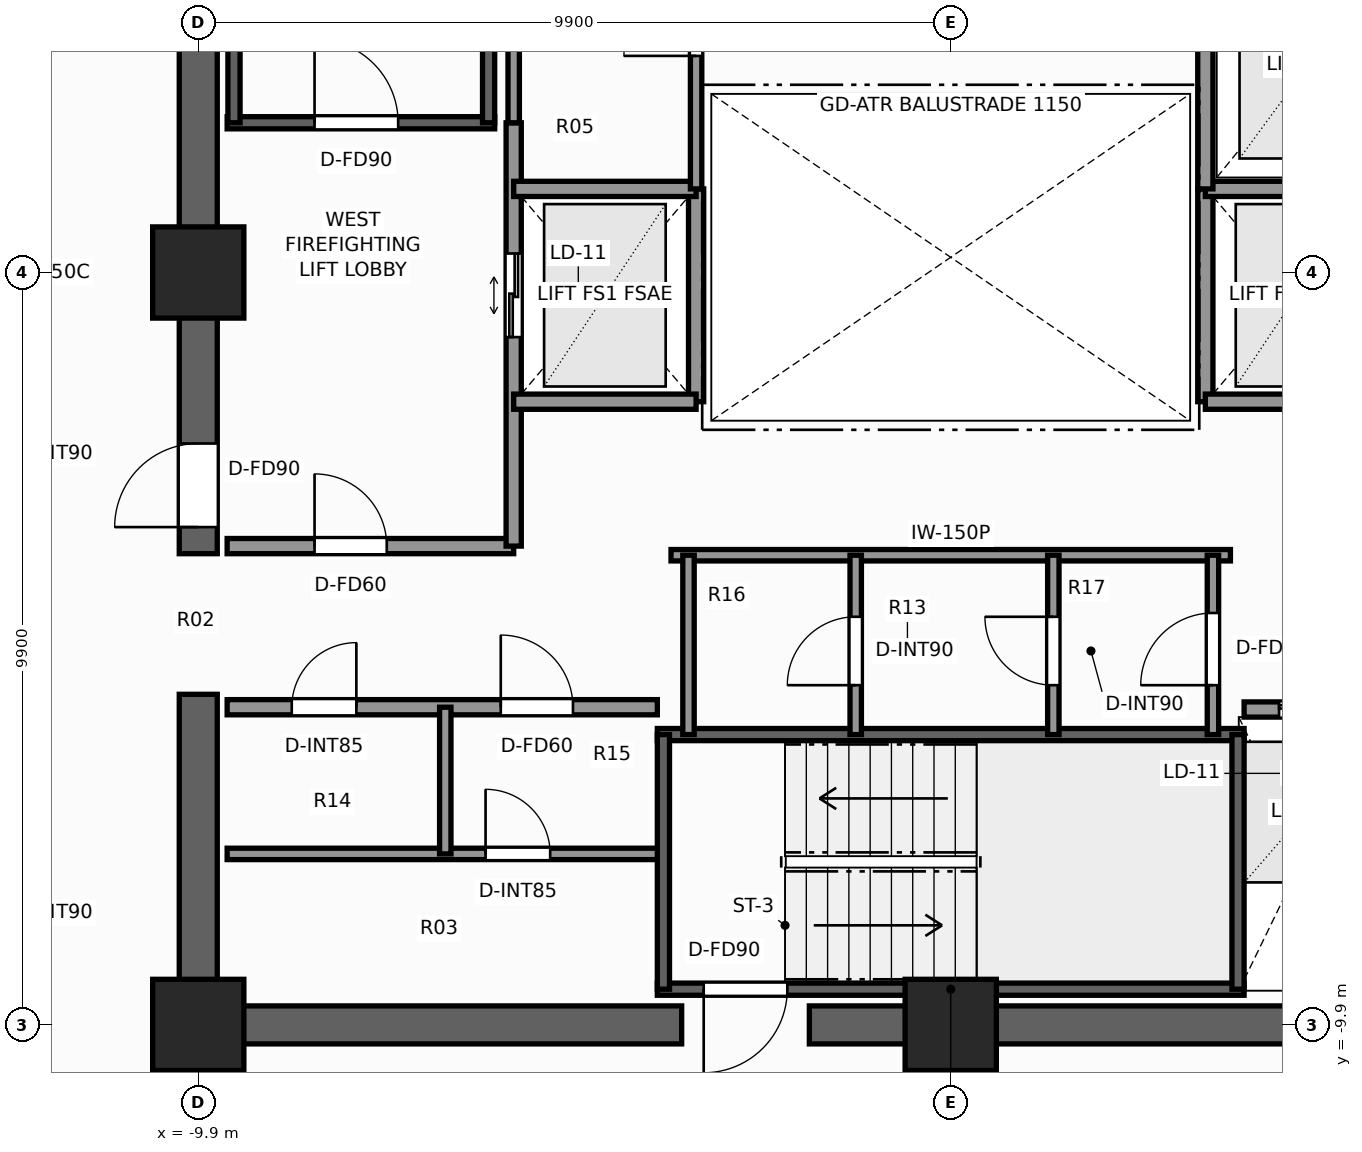
"""IFC4 building model, lengths in metres.
Left out: names, types, materials, properties, quantities, classifications, styles, units other than length and angle.
Written with IfcOpenShell. Run it as: python <this file> out.ifc"""

import sys

from ifc_helpers import new_model, si_unit, direction, frame, frame_2d, origin, origin_2d, place, context, subcontext, project, spatial, rectangle, extrude, element, fill, save


model = new_model("IFC4")
c1 = context("Model", 3, precision=1e-05, world=origin(), true_north=direction((0.0, 1.0)))
c2 = subcontext(c1, "Body", "Model", "MODEL_VIEW")
j1 = project(units=[si_unit("LENGTHUNIT", "METRE"), si_unit("PLANEANGLEUNIT", "RADIAN")], contexts=[c1])
p1 = place(None, origin())
s1 = spatial("IfcSite", under=j1, at=p1, CompositionType="ELEMENT")
p2 = place(p1, origin())
s2 = spatial("IfcBuilding", under=s1, at=p2, CompositionType="ELEMENT")
p3 = place(p2, frame((0.0, 0.0, 170.1)))
s3 = spatial("IfcBuildingStorey", under=s2, at=p3, CompositionType="ELEMENT", Elevation=170.1)
p4 = place(p3, frame((10.15, -9.9, 0.0), z_axis=(0.0, 0.0, 1.0), x_axis=(-1.0, 0.0, 0.0)))
e1 = element("IfcWall", 1, at=p4, inside=s3, PredefinedType="SHEAR", context=c2, shape_type="SweptSolid", body=[
    extrude(rectangle(XDim=12.01, YDim=0.5, at=frame_2d((6.005, 0.0))), origin(), (0.0, 0.0, 1.0), 3.3),
])
p5 = place(p3, frame((-3.54, -9.9, 0.0), z_axis=(0.0, 0.0, 1.0), x_axis=(-1.0, 0.0, 0.0)))
e2 = element("IfcWall", 2, at=p5, inside=s3, PredefinedType="SHEAR", context=c2, shape_type="SweptSolid", body=[
    extrude(rectangle(XDim=6.61, YDim=0.5, at=frame_2d((3.305, 0.0))), origin(), (0.0, 0.0, 1.0), 3.3),
])
p6 = place(p3, frame((-9.9, -9.65, 0.0), z_axis=(0.0, 0.0, 1.0), x_axis=(0.0, 1.0, 0.0)))
e3 = element("IfcWall", 3, at=p6, inside=s3, PredefinedType="SHEAR", context=c2, shape_type="SweptSolid", body=[
    extrude(rectangle(XDim=4.1, YDim=0.5, at=frame_2d((2.05, 0.0))), origin(), (0.0, 0.0, 1.0), 3.3),
])
p7 = place(p3, frame((-9.9, -3.7, 0.0), z_axis=(0.0, 0.0, 1.0), x_axis=(0.0, 1.0, 0.0)))
e4 = element("IfcWall", 4, at=p7, inside=s3, PredefinedType="SHEAR", context=c2, shape_type="SweptSolid", body=[
    extrude(rectangle(XDim=13.35, YDim=0.5, at=frame_2d((6.675, 0.0))), origin(), (0.0, 0.0, 1.0), 3.3),
])
p8 = place(p7, frame((0.35, 0.0, 0.0)))
e5 = element("IfcOpeningElement", 5, at=p8, cuts=e4, PredefinedType="OPENING", context=c2, shape_type="SweptSolid", body=[
    extrude(rectangle(XDim=1.1, YDim=2.2, at=frame_2d((0.55, 1.1))), frame((0.0, 0.26, 0.0), z_axis=(0.0, -1.0, 0.0), x_axis=(1.0, 0.0, 0.0)), (0.0, 0.0, 1.0), 0.52),
])
for number, where, z_axis, x_axis in (
    (6, (-9.9, -9.9, 0.0), (0.0, 0.0, 1.0), (1.0, 0.0, 0.0)),
    (7, (0.0, -9.9, 0.0), (0.0, 0.0, 1.0), (1.0, 0.0, 0.0)),
    (8, (-9.9, 0.0, 0.0), (0.0, 0.0, 1.0), (1.0, 0.0, 0.0)),
):
    element("IfcColumn", number, at=place(p3, frame(where, z_axis=z_axis, x_axis=x_axis)), inside=s3, PredefinedType="COLUMN", context=c2, shape_type="SweptSolid", body=[
        extrude(rectangle(XDim=1.2, YDim=1.2, at=origin_2d()), origin(), (0.0, 0.0, 1.0), 3.3),
    ])
p9 = place(p3, frame((-9.52, 1.97, 0.0), z_axis=(0.0, 0.0, 1.0), x_axis=(1.0, 0.0, 0.0)))
e9 = element("IfcWall", 9, at=p9, inside=s3, PredefinedType="SHEAR", context=c2, shape_type="SweptSolid", body=[
    extrude(rectangle(XDim=3.52, YDim=0.16, at=frame_2d((1.76, 0.0))), origin(), (0.0, 0.0, 1.0), 3.3),
])
p10 = place(p9, frame((1.15, 0.0, 0.0)))
e10 = element("IfcOpeningElement", 10, at=p10, cuts=e9, PredefinedType="OPENING", context=c2, shape_type="SweptSolid", body=[
    extrude(rectangle(XDim=1.1, YDim=2.2, at=frame_2d((0.55, 1.1))), frame((0.0, 0.09, 0.0), z_axis=(0.0, -1.0, 0.0), x_axis=(1.0, 0.0, 0.0)), (0.0, 0.0, 1.0), 0.18),
])
for number, where, z_axis, x_axis in (
    (11, (-9.43, 1.97, 0.0), (0.0, 0.0, 1.0), (0.0, 1.0, 0.0)),
    (12, (-6.08, 1.97, 0.0), (0.0, 0.0, 1.0), (0.0, 1.0, 0.0)),
):
    element("IfcWall", number, at=place(p3, frame(where, z_axis=z_axis, x_axis=x_axis)), inside=s3, PredefinedType="SHEAR", context=c2, shape_type="SweptSolid", body=[
        extrude(rectangle(XDim=7.56, YDim=0.16, at=frame_2d((3.78, 0.0))), origin(), (0.0, 0.0, 1.0), 3.3),
    ])
p11 = place(p3, frame((3.86, -9.43, 0.0), z_axis=(0.0, 0.0, 1.0), x_axis=(-1.0, 0.0, 0.0)))
e13 = element("IfcWall", 13, at=p11, inside=s3, PredefinedType="SHEAR", context=c2, shape_type="SweptSolid", body=[
    extrude(rectangle(XDim=7.72, YDim=0.16, at=frame_2d((3.86, 0.0))), origin(), (0.0, 0.0, 1.0), 3.3),
])
p12 = place(p11, frame((6.01, 0.0, 0.0)))
e14 = element("IfcOpeningElement", 14, at=p12, cuts=e13, PredefinedType="OPENING", context=c2, shape_type="SweptSolid", body=[
    extrude(rectangle(XDim=1.1, YDim=2.2, at=frame_2d((0.55, 1.1))), frame((0.0, 0.09, 0.0), z_axis=(0.0, -1.0, 0.0), x_axis=(1.0, 0.0, 0.0)), (0.0, 0.0, 1.0), 0.18),
])
p13 = place(p3, frame((-3.86, -6.08, 0.0), z_axis=(0.0, 0.0, 1.0), x_axis=(1.0, 0.0, 0.0)))
e15 = element("IfcWall", 15, at=p13, inside=s3, PredefinedType="SHEAR", context=c2, shape_type="SweptSolid", body=[
    extrude(rectangle(XDim=7.72, YDim=0.16, at=frame_2d((3.86, 0.0))), origin(), (0.0, 0.0, 1.0), 3.3),
])
for number, where, z_axis, x_axis in (
    (16, (-3.78, -9.43, 0.0), (0.0, 0.0, 1.0), (0.0, 1.0, 0.0)),
    (17, (3.78, -9.43, 0.0), (0.0, 0.0, 1.0), (0.0, 1.0, 0.0)),
):
    element("IfcWall", number, at=place(p3, frame(where, z_axis=z_axis, x_axis=x_axis)), inside=s3, PredefinedType="SHEAR", context=c2, shape_type="SweptSolid", body=[
        extrude(rectangle(XDim=3.35, YDim=0.16, at=frame_2d((1.675, 0.0))), origin(), (0.0, 0.0, 1.0), 3.3),
    ])
p14 = place(p3, frame((-9.52, -3.6, 0.0), z_axis=(0.0, 0.0, 1.0), x_axis=(1.0, 0.0, 0.0)))
e18 = element("IfcWall", 18, at=p14, inside=s3, PredefinedType="SOLIDWALL", context=c2, shape_type="SweptSolid", body=[
    extrude(rectangle(XDim=3.77, YDim=0.2, at=frame_2d((1.885, 0.0))), origin(), (0.0, 0.0, 1.0), 3.08),
])
p15 = place(p14, frame((1.15, 0.0, 0.0)))
e19 = element("IfcOpeningElement", 19, at=p15, cuts=e18, PredefinedType="OPENING", context=c2, shape_type="SweptSolid", body=[
    extrude(rectangle(XDim=0.95, YDim=2.06, at=frame_2d((0.475, 1.03))), frame((0.0, 0.11, 0.0), z_axis=(0.0, -1.0, 0.0), x_axis=(1.0, 0.0, 0.0)), (0.0, 0.0, 1.0), 0.22),
])
p16 = place(p3, frame((-5.75, -3.6, 0.0), z_axis=(0.0, 0.0, 1.0), x_axis=(0.0, 1.0, 0.0)))
e20 = element("IfcWall", 20, at=p16, inside=s3, PredefinedType="SOLIDWALL", context=c2, shape_type="SweptSolid", body=[
    extrude(rectangle(XDim=5.57, YDim=0.2, at=frame_2d((2.785, 0.0))), origin(), (0.0, 0.0, 1.0), 2.715),
])
p17 = place(p16, frame((2.75, 0.0, 0.0)))
e21 = element("IfcOpeningElement", 21, at=p17, cuts=e20, PredefinedType="OPENING", context=c2, shape_type="SweptSolid", body=[
    extrude(rectangle(XDim=1.1, YDim=2.2, at=frame_2d((0.55, 1.1))), frame((0.0, 0.11, 0.0), z_axis=(0.0, -1.0, 0.0), x_axis=(1.0, 0.0, 0.0)), (0.0, 0.0, 1.0), 0.22),
])
p18 = place(p3, frame((-3.35, -1.7, 0.0), z_axis=(0.0, 0.0, 1.0), x_axis=(0.0, 1.0, 0.0)))
e22 = element("IfcWall", 22, at=p18, inside=s3, PredefinedType="SOLIDWALL", context=c2, shape_type="SweptSolid", body=[
    extrude(rectangle(XDim=2.8, YDim=0.2, at=frame_2d((1.4, 0.0))), origin(), (0.0, 0.0, 1.0), 2.715),
])
for number, where, z_axis, x_axis in (
    (23, (-5.75, -1.7, 0.0), (0.0, 0.0, 1.0), (1.0, 0.0, 0.0)),
    (24, (-5.75, 1.1, 0.0), (0.0, 0.0, 1.0), (1.0, 0.0, 0.0)),
):
    element("IfcWall", number, at=place(p3, frame(where, z_axis=z_axis, x_axis=x_axis)), inside=s3, PredefinedType="SOLIDWALL", context=c2, shape_type="SweptSolid", body=[
        extrude(rectangle(XDim=2.4, YDim=0.2, at=frame_2d((1.2, 0.0))), origin(), (0.0, 0.0, 1.0), 3.08),
    ])
p19 = place(p3, frame((3.35, -1.7, 0.0), z_axis=(0.0, 0.0, 1.0), x_axis=(0.0, 1.0, 0.0)))
e25 = element("IfcWall", 25, at=p19, inside=s3, PredefinedType="SOLIDWALL", context=c2, shape_type="SweptSolid", body=[
    extrude(rectangle(XDim=2.8, YDim=0.2, at=frame_2d((1.4, 0.0))), origin(), (0.0, 0.0, 1.0), 2.715),
])
for number, where, z_axis, x_axis in (
    (26, (3.35, -1.7, 0.0), (0.0, 0.0, 1.0), (1.0, 0.0, 0.0)),
    (27, (3.35, 1.1, 0.0), (0.0, 0.0, 1.0), (1.0, 0.0, 0.0)),
):
    element("IfcWall", number, at=place(p3, frame(where, z_axis=z_axis, x_axis=x_axis)), inside=s3, PredefinedType="SOLIDWALL", context=c2, shape_type="SweptSolid", body=[
        extrude(rectangle(XDim=2.4, YDim=0.2, at=frame_2d((1.2, 0.0))), origin(), (0.0, 0.0, 1.0), 3.08),
    ])
p20 = place(p3, frame((3.35, 1.1, 0.0), z_axis=(0.0, 0.0, 1.0), x_axis=(0.0, 1.0, 0.0)))
e28 = element("IfcWall", 28, at=p20, inside=s3, PredefinedType="SOLIDWALL", context=c2, shape_type="SweptSolid", body=[
    extrude(rectangle(XDim=3.2, YDim=0.2, at=frame_2d((1.6, 0.0))), origin(), (0.0, 0.0, 1.0), 2.715),
])
p21 = place(p3, frame((-9.52, -5.72, 0.0), z_axis=(0.0, 0.0, 1.0), x_axis=(1.0, 0.0, 0.0)))
e29 = element("IfcWall", 29, at=p21, inside=s3, PredefinedType="SOLIDWALL", context=c2, shape_type="SweptSolid", body=[
    extrude(rectangle(XDim=5.66, YDim=0.2, at=frame_2d((2.83, 0.0))), origin(), (0.0, 0.0, 1.0), 3.08),
])
p22 = place(p21, frame((3.6, 0.0, 0.0)))
e30 = element("IfcOpeningElement", 30, at=p22, cuts=e29, PredefinedType="OPENING", context=c2, shape_type="SweptSolid", body=[
    extrude(rectangle(XDim=0.95, YDim=2.06, at=frame_2d((0.475, 1.03))), frame((0.0, 0.11, 0.0), z_axis=(0.0, -1.0, 0.0), x_axis=(1.0, 0.0, 0.0)), (0.0, 0.0, 1.0), 0.22),
])
p23 = place(p21, frame((0.85, 0.0, 0.0)))
e31 = element("IfcOpeningElement", 31, at=p23, cuts=e29, PredefinedType="OPENING", context=c2, shape_type="SweptSolid", body=[
    extrude(rectangle(XDim=0.85, YDim=2.03, at=frame_2d((0.425, 1.015))), frame((0.0, 0.11, 0.0), z_axis=(0.0, -1.0, 0.0), x_axis=(1.0, 0.0, 0.0)), (0.0, 0.0, 1.0), 0.22),
])
p24 = place(p3, frame((-9.52, -7.65, 0.0), z_axis=(0.0, 0.0, 1.0), x_axis=(1.0, 0.0, 0.0)))
e32 = element("IfcWall", 32, at=p24, inside=s3, PredefinedType="PARTITIONING", context=c2, shape_type="SweptSolid", body=[
    extrude(rectangle(XDim=5.66, YDim=0.15, at=frame_2d((2.83, 0.0))), origin(), (0.0, 0.0, 1.0), 3.08),
])
p25 = place(p24, frame((3.4, 0.0, 0.0)))
e33 = element("IfcOpeningElement", 33, at=p25, cuts=e32, PredefinedType="OPENING", context=c2, shape_type="SweptSolid", body=[
    extrude(rectangle(XDim=0.85, YDim=2.03, at=frame_2d((0.425, 1.015))), frame((0.0, 0.085, 0.0), z_axis=(0.0, -1.0, 0.0), x_axis=(1.0, 0.0, 0.0)), (0.0, 0.0, 1.0), 0.17),
])
p26 = place(p3, frame((-6.65, -7.65, 0.0), z_axis=(0.0, 0.0, 1.0), x_axis=(0.0, 1.0, 0.0)))
e34 = element("IfcWall", 34, at=p26, inside=s3, PredefinedType="PARTITIONING", context=c2, shape_type="SweptSolid", body=[
    extrude(rectangle(XDim=1.93, YDim=0.15, at=frame_2d((0.965, 0.0))), origin(), (0.0, 0.0, 1.0), 3.08),
])
p27 = place(p3, frame((3.86, -5.75, 0.0), z_axis=(0.0, 0.0, 1.0), x_axis=(1.0, 0.0, 0.0)))
e35 = element("IfcWall", 35, at=p27, inside=s3, PredefinedType="SOLIDWALL", context=c2, shape_type="SweptSolid", body=[
    extrude(rectangle(XDim=5.66, YDim=0.2, at=frame_2d((2.83, 0.0))), origin(), (0.0, 0.0, 1.0), 3.08),
])
p28 = place(p27, frame((0.46, 0.0, 0.0)))
e36 = element("IfcOpeningElement", 36, at=p28, cuts=e35, PredefinedType="OPENING", context=c2, shape_type="SweptSolid", body=[
    extrude(rectangle(XDim=1.1, YDim=2.2, at=frame_2d((0.55, 1.1))), frame((0.0, 0.11, 0.0), z_axis=(0.0, -1.0, 0.0), x_axis=(1.0, 0.0, 0.0)), (0.0, 0.0, 1.0), 0.22),
])
p29 = place(p27, frame((2.39, 0.0, 0.0)))
e37 = element("IfcOpeningElement", 37, at=p29, cuts=e35, PredefinedType="OPENING", context=c2, shape_type="SweptSolid", body=[
    extrude(rectangle(XDim=1.1, YDim=2.2, at=frame_2d((0.55, 1.1))), frame((0.0, 0.11, 0.0), z_axis=(0.0, -1.0, 0.0), x_axis=(1.0, 0.0, 0.0)), (0.0, 0.0, 1.0), 0.22),
])
p30 = place(p27, frame((4.32, 0.0, 0.0)))
e38 = element("IfcOpeningElement", 38, at=p30, cuts=e35, PredefinedType="OPENING", context=c2, shape_type="SweptSolid", body=[
    extrude(rectangle(XDim=1.1, YDim=2.2, at=frame_2d((0.55, 1.1))), frame((0.0, 0.11, 0.0), z_axis=(0.0, -1.0, 0.0), x_axis=(1.0, 0.0, 0.0)), (0.0, 0.0, 1.0), 0.22),
])
p31 = place(p3, frame((-3.68, -3.72, 0.0), z_axis=(0.0, 0.0, 1.0), x_axis=(1.0, 0.0, 0.0)))
e39 = element("IfcWall", 39, at=p31, inside=s3, PredefinedType="PARTITIONING", context=c2, shape_type="SweptSolid", body=[
    extrude(rectangle(XDim=7.36, YDim=0.15, at=frame_2d((3.68, 0.0))), origin(), (0.0, 0.0, 1.0), 3.08),
])
p32 = place(p3, frame((3.45, -6.08, 0.0), z_axis=(0.0, 0.0, 1.0), x_axis=(0.0, 1.0, 0.0)))
e40 = element("IfcWall", 40, at=p32, inside=s3, PredefinedType="PARTITIONING", context=c2, shape_type="SweptSolid", body=[
    extrude(rectangle(XDim=2.36, YDim=0.15, at=frame_2d((1.18, 0.0))), origin(), (0.0, 0.0, 1.0), 3.08),
])
p33 = place(p32, frame((0.65, 0.0, 0.0)))
e41 = element("IfcOpeningElement", 41, at=p33, cuts=e40, PredefinedType="OPENING", context=c2, shape_type="SweptSolid", body=[
    extrude(rectangle(XDim=0.95, YDim=2.06, at=frame_2d((0.475, 1.03))), frame((0.0, 0.085, 0.0), z_axis=(0.0, -1.0, 0.0), x_axis=(1.0, 0.0, 0.0)), (0.0, 0.0, 1.0), 0.17),
])
p34 = place(p3, frame((-3.45, -6.08, 0.0), z_axis=(0.0, 0.0, 1.0), x_axis=(0.0, 1.0, 0.0)))
e42 = element("IfcWall", 42, at=p34, inside=s3, PredefinedType="PARTITIONING", context=c2, shape_type="SweptSolid", body=[
    extrude(rectangle(XDim=2.36, YDim=0.15, at=frame_2d((1.18, 0.0))), origin(), (0.0, 0.0, 1.0), 3.08),
])
p35 = place(p3, frame((1.35, -6.08, 0.0), z_axis=(0.0, 0.0, 1.0), x_axis=(0.0, 1.0, 0.0)))
e43 = element("IfcWall", 43, at=p35, inside=s3, PredefinedType="PARTITIONING", context=c2, shape_type="SweptSolid", body=[
    extrude(rectangle(XDim=2.36, YDim=0.15, at=frame_2d((1.18, 0.0))), origin(), (0.0, 0.0, 1.0), 3.08),
])
p36 = place(p35, frame((0.65, 0.0, 0.0)))
e44 = element("IfcOpeningElement", 44, at=p36, cuts=e43, PredefinedType="OPENING", context=c2, shape_type="SweptSolid", body=[
    extrude(rectangle(XDim=0.9, YDim=2.06, at=frame_2d((0.45, 1.03))), frame((0.0, 0.085, 0.0), z_axis=(0.0, -1.0, 0.0), x_axis=(1.0, 0.0, 0.0)), (0.0, 0.0, 1.0), 0.17),
])
p37 = place(p3, frame((-1.25, -6.08, 0.0), z_axis=(0.0, 0.0, 1.0), x_axis=(0.0, 1.0, 0.0)))
e45 = element("IfcWall", 45, at=p37, inside=s3, PredefinedType="PARTITIONING", context=c2, shape_type="SweptSolid", body=[
    extrude(rectangle(XDim=2.36, YDim=0.15, at=frame_2d((1.18, 0.0))), origin(), (0.0, 0.0, 1.0), 3.08),
])
p38 = place(p37, frame((0.65, 0.0, 0.0)))
e46 = element("IfcOpeningElement", 46, at=p38, cuts=e45, PredefinedType="OPENING", context=c2, shape_type="SweptSolid", body=[
    extrude(rectangle(XDim=0.9, YDim=2.06, at=frame_2d((0.45, 1.03))), frame((0.0, 0.085, 0.0), z_axis=(0.0, -1.0, 0.0), x_axis=(1.0, 0.0, 0.0)), (0.0, 0.0, 1.0), 0.17),
])
p39 = place(p3, frame((-3.35, 1.1, 0.0), z_axis=(0.0, 0.0, 1.0), x_axis=(0.0, 1.0, 0.0)))
e47 = element("IfcWall", 47, at=p39, inside=s3, PredefinedType="PARTITIONING", context=c2, shape_type="SweptSolid", body=[
    extrude(rectangle(XDim=3.2, YDim=0.15, at=frame_2d((1.6, 0.0))), origin(), (0.0, 0.0, 1.0), 2.715),
])
p40 = place(p39, frame((1.75, 0.0, 0.0)))
e48 = element("IfcOpeningElement", 48, at=p40, cuts=e47, PredefinedType="OPENING", context=c2, shape_type="SweptSolid", body=[
    extrude(rectangle(XDim=0.95, YDim=2.06, at=frame_2d((0.475, 1.03))), frame((0.0, 0.085, 0.0), z_axis=(0.0, -1.0, 0.0), x_axis=(1.0, 0.0, 0.0)), (0.0, 0.0, 1.0), 0.17),
])
p41 = place(p3, frame((-5.75, 1.97, 0.0), z_axis=(0.0, 0.0, 1.0), x_axis=(0.0, 1.0, 0.0)))
e49 = element("IfcWall", 49, at=p41, inside=s3, PredefinedType="PARTITIONING", context=c2, shape_type="SweptSolid", body=[
    extrude(rectangle(XDim=2.33, YDim=0.15, at=frame_2d((1.165, 0.0))), origin(), (0.0, 0.0, 1.0), 2.715),
])
p42 = place(p10, origin())
e50 = element("IfcDoor", 50, at=p42, inside=s3, OperationType="SINGLE_SWING_LEFT", PredefinedType="DOOR", context=c2, shape_type="SweptSolid", body=[
    extrude(rectangle(XDim=1.1, YDim=2.2, at=frame_2d((0.55, 1.1))), frame((0.0, 0.025, 0.0), z_axis=(0.0, -1.0, 0.0), x_axis=(1.0, 0.0, 0.0)), (0.0, 0.0, 1.0), 0.05),
])
fill(e10, e50)
p43 = place(p12, origin())
e51 = element("IfcDoor", 51, at=p43, inside=s3, OperationType="SINGLE_SWING_RIGHT", PredefinedType="DOOR", context=c2, shape_type="SweptSolid", body=[
    extrude(rectangle(XDim=1.1, YDim=2.2, at=frame_2d((0.55, 1.1))), frame((0.0, 0.025, 0.0), z_axis=(0.0, -1.0, 0.0), x_axis=(1.0, 0.0, 0.0)), (0.0, 0.0, 1.0), 0.05),
])
fill(e14, e51)
p44 = place(p8, origin())
e52 = element("IfcDoor", 52, at=p44, inside=s3, OperationType="SINGLE_SWING_LEFT", PredefinedType="DOOR", context=c2, shape_type="SweptSolid", body=[
    extrude(rectangle(XDim=1.1, YDim=2.2, at=frame_2d((0.55, 1.1))), frame((0.0, 0.025, 0.0), z_axis=(0.0, -1.0, 0.0), x_axis=(1.0, 0.0, 0.0)), (0.0, 0.0, 1.0), 0.05),
])
fill(e5, e52)
p45 = place(p17, origin())
e53 = element("IfcDoor", 53, at=p45, inside=s3, OperationType="DOUBLE_DOOR_SLIDING", PredefinedType="DOOR", context=c2, shape_type="SweptSolid", body=[
    extrude(rectangle(XDim=1.1, YDim=2.2, at=frame_2d((0.55, 1.1))), frame((0.0, 0.025, 0.0), z_axis=(0.0, -1.0, 0.0), x_axis=(1.0, 0.0, 0.0)), (0.0, 0.0, 1.0), 0.05),
])
fill(e21, e53)
p46 = place(p22, origin())
e54 = element("IfcDoor", 54, at=p46, inside=s3, OperationType="SINGLE_SWING_LEFT", PredefinedType="DOOR", context=c2, shape_type="SweptSolid", body=[
    extrude(rectangle(XDim=0.95, YDim=2.06, at=frame_2d((0.475, 1.03))), frame((0.0, 0.025, 0.0), z_axis=(0.0, -1.0, 0.0), x_axis=(1.0, 0.0, 0.0)), (0.0, 0.0, 1.0), 0.05),
])
fill(e30, e54)
p47 = place(p23, origin())
e55 = element("IfcDoor", 55, at=p47, inside=s3, OperationType="SINGLE_SWING_RIGHT", PredefinedType="DOOR", context=c2, shape_type="SweptSolid", body=[
    extrude(rectangle(XDim=0.85, YDim=2.03, at=frame_2d((0.425, 1.015))), frame((0.0, 0.025, 0.0), z_axis=(0.0, -1.0, 0.0), x_axis=(1.0, 0.0, 0.0)), (0.0, 0.0, 1.0), 0.05),
])
fill(e31, e55)
p48 = place(p25, origin())
e56 = element("IfcDoor", 56, at=p48, inside=s3, OperationType="SINGLE_SWING_LEFT", PredefinedType="DOOR", context=c2, shape_type="SweptSolid", body=[
    extrude(rectangle(XDim=0.85, YDim=2.03, at=frame_2d((0.425, 1.015))), frame((0.0, 0.025, 0.0), z_axis=(0.0, -1.0, 0.0), x_axis=(1.0, 0.0, 0.0)), (0.0, 0.0, 1.0), 0.05),
])
fill(e33, e56)
p49 = place(p15, origin())
e57 = element("IfcDoor", 57, at=p49, inside=s3, OperationType="SINGLE_SWING_LEFT", PredefinedType="DOOR", context=c2, shape_type="SweptSolid", body=[
    extrude(rectangle(XDim=0.95, YDim=2.06, at=frame_2d((0.475, 1.03))), frame((0.0, 0.025, 0.0), z_axis=(0.0, -1.0, 0.0), x_axis=(1.0, 0.0, 0.0)), (0.0, 0.0, 1.0), 0.05),
])
fill(e19, e57)
p50 = place(p28, origin())
e58 = element("IfcDoor", 58, at=p50, inside=s3, OperationType="DOUBLE_DOOR_SLIDING", PredefinedType="DOOR", context=c2, shape_type="SweptSolid", body=[
    extrude(rectangle(XDim=1.1, YDim=2.2, at=frame_2d((0.55, 1.1))), frame((0.0, 0.025, 0.0), z_axis=(0.0, -1.0, 0.0), x_axis=(1.0, 0.0, 0.0)), (0.0, 0.0, 1.0), 0.05),
])
fill(e36, e58)
p51 = place(p33, origin())
e59 = element("IfcDoor", 59, at=p51, inside=s3, OperationType="SINGLE_SWING_LEFT", PredefinedType="DOOR", context=c2, shape_type="SweptSolid", body=[
    extrude(rectangle(XDim=0.95, YDim=2.06, at=frame_2d((0.475, 1.03))), frame((0.0, 0.025, 0.0), z_axis=(0.0, -1.0, 0.0), x_axis=(1.0, 0.0, 0.0)), (0.0, 0.0, 1.0), 0.05),
])
fill(e41, e59)
p52 = place(p36, origin())
e60 = element("IfcDoor", 60, at=p52, inside=s3, OperationType="SINGLE_SWING_RIGHT", PredefinedType="DOOR", context=c2, shape_type="SweptSolid", body=[
    extrude(rectangle(XDim=0.9, YDim=2.06, at=frame_2d((0.45, 1.03))), frame((0.0, 0.025, 0.0), z_axis=(0.0, -1.0, 0.0), x_axis=(1.0, 0.0, 0.0)), (0.0, 0.0, 1.0), 0.05),
])
fill(e44, e60)
p53 = place(p38, origin())
e61 = element("IfcDoor", 61, at=p53, inside=s3, OperationType="SINGLE_SWING_LEFT", PredefinedType="DOOR", context=c2, shape_type="SweptSolid", body=[
    extrude(rectangle(XDim=0.9, YDim=2.06, at=frame_2d((0.45, 1.03))), frame((0.0, 0.025, 0.0), z_axis=(0.0, -1.0, 0.0), x_axis=(1.0, 0.0, 0.0)), (0.0, 0.0, 1.0), 0.05),
])
fill(e46, e61)
p54 = place(p40, origin())
e62 = element("IfcDoor", 62, at=p54, inside=s3, OperationType="SINGLE_SWING_LEFT", PredefinedType="DOOR", context=c2, shape_type="SweptSolid", body=[
    extrude(rectangle(XDim=0.95, YDim=2.06, at=frame_2d((0.475, 1.03))), frame((0.0, 0.025, 0.0), z_axis=(0.0, -1.0, 0.0), x_axis=(1.0, 0.0, 0.0)), (0.0, 0.0, 1.0), 0.05),
])
fill(e48, e62)
save(model, sys.argv[1])
